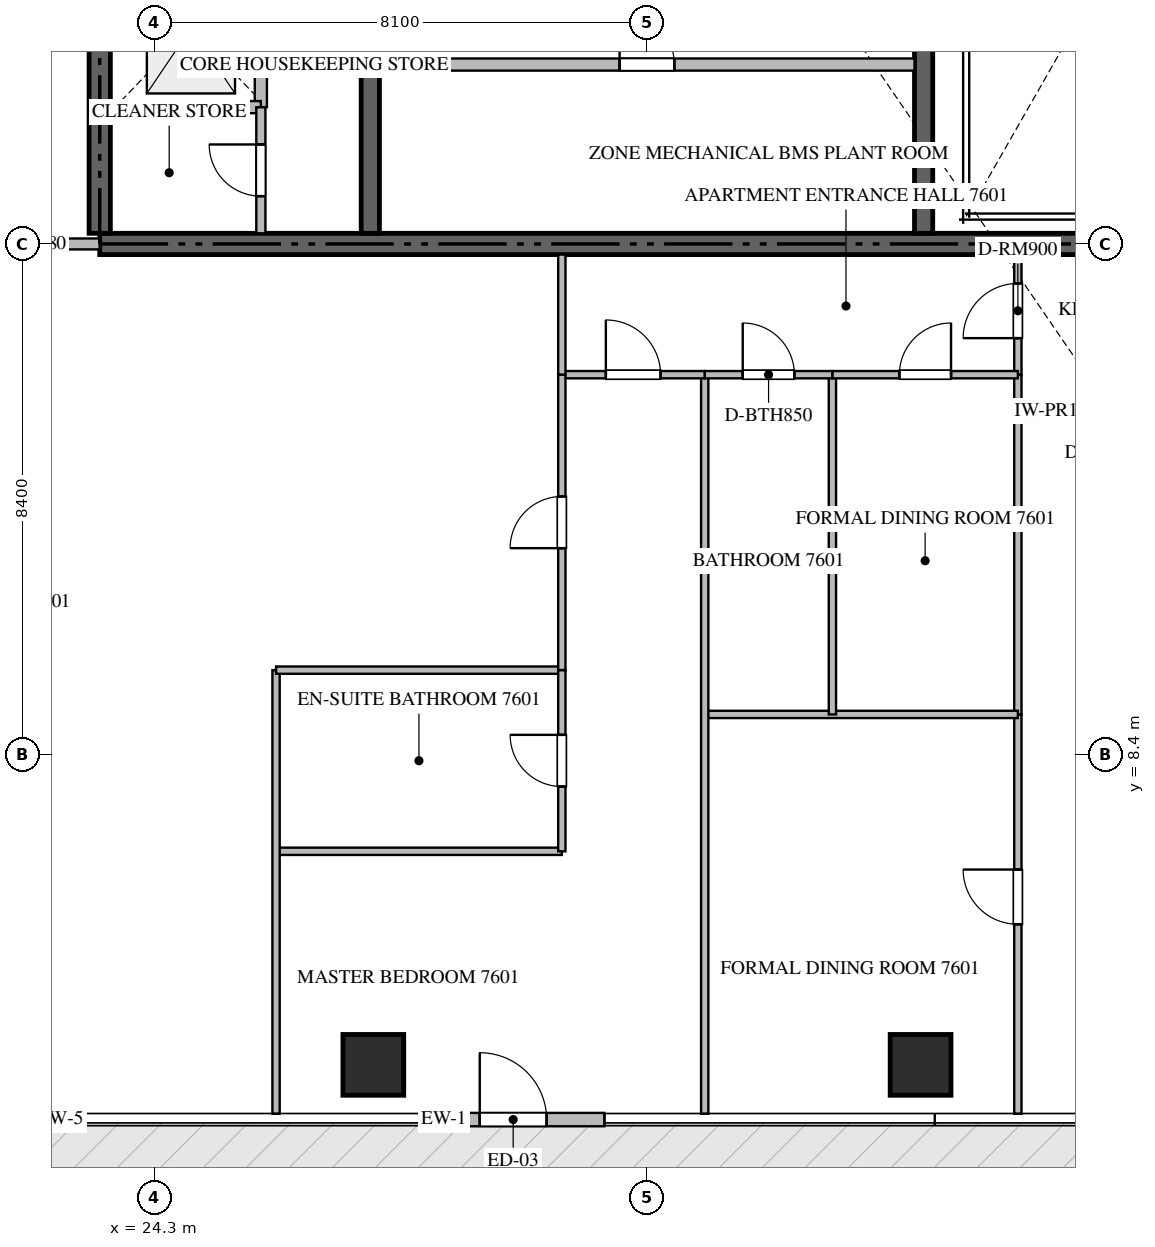
"""IFC4 building model, lengths in metres.
Left out: names, types, materials, properties, quantities, classifications, styles, units other than length and angle.
Written with IfcOpenShell. Run it as: python <this file> out.ifc"""

import sys

from ifc_helpers import new_model, si_unit, direction, frame, frame_2d, origin, origin_2d, place, context, subcontext, project, spatial, rectangle, extrude, source, transform, mapped, element, fill, save


model = new_model("IFC4")
c1 = context("Model", 3, precision=1e-05, world=origin(), true_north=direction((0.0, 1.0)))
c2 = subcontext(c1, "Body", "Model", "MODEL_VIEW")
j1 = project(units=[si_unit("LENGTHUNIT", "METRE"), si_unit("PLANEANGLEUNIT", "RADIAN")], contexts=[c1])
p1 = place(None, origin())
s1 = spatial("IfcSite", under=j1, at=p1, CompositionType="ELEMENT")
p2 = place(p1, origin())
s2 = spatial("IfcBuilding", under=s1, at=p2, CompositionType="ELEMENT")
p3 = place(p2, frame((0.0, 0.0, 305.6)))
s3 = spatial("IfcBuildingStorey", under=s2, at=p3, CompositionType="ELEMENT", Elevation=305.6)
p4 = place(p3, frame((23.4, 16.8, -0.26), z_axis=(0.0, 0.0, 1.0), x_axis=(1.0, 0.0, 0.0)))
e1 = element("IfcWall", 1, at=p4, inside=s3, PredefinedType="SHEAR", context=c2, shape_type="SweptSolid", body=[
    extrude(rectangle(XDim=18.0, YDim=0.35, at=frame_2d((9.0, 0.0))), origin(), (0.0, 0.0, 1.0), 4.048),
])
p5 = place(p3, frame((23.4, 16.975, -0.26), z_axis=(0.0, 0.0, 1.0), x_axis=(0.0, 1.0, 0.0)))
e2 = element("IfcWall", 2, at=p5, inside=s3, PredefinedType="SHEAR", context=c2, shape_type="SweptSolid", body=[
    extrude(rectangle(XDim=4.875, YDim=0.35, at=frame_2d((2.438, 0.0))), origin(), (0.0, 0.0, 1.0), 4.048),
])
p6 = place(p3, frame((27.85, 16.975, -0.26), z_axis=(0.0, 0.0, 1.0), x_axis=(0.0, 1.0, 0.0)))
e3 = element("IfcWall", 3, at=p6, inside=s3, PredefinedType="SHEAR", context=c2, shape_type="SweptSolid", body=[
    extrude(rectangle(XDim=4.875, YDim=0.3, at=frame_2d((2.438, 0.0))), origin(), (0.0, 0.0, 1.0), 4.048),
])
p7 = place(p3, frame((36.95, 16.975, -0.26), z_axis=(0.0, 0.0, 1.0), x_axis=(0.0, 1.0, 0.0)))
e4 = element("IfcWall", 4, at=p7, inside=s3, PredefinedType="SHEAR", context=c2, shape_type="SweptSolid", body=[
    extrude(rectangle(XDim=8.375, YDim=0.3, at=frame_2d((4.188, 0.0))), origin(), (0.0, 0.0, 1.0), 4.048),
])
m1 = source(origin(), c2, "Body", "SweptSolid", [
    extrude(rectangle(XDim=1.0, YDim=1.0, at=origin_2d()), origin(), (0.0, 0.0, 1.0), 4.05),
])
for number, where, z_axis, x_axis in (
    (5, (27.9, 3.3, -0.26), (0.0, 0.0, 1.0), (1.0, 0.0, 0.0)),
    (6, (36.9, 3.3, -0.26), (0.0, 0.0, 1.0), (1.0, 0.0, 0.0)),
):
    element("IfcColumn", number, at=place(p3, frame(where, z_axis=z_axis, x_axis=x_axis)), inside=s3, PredefinedType="COLUMN", context=c2, shape_type="MappedRepresentation", body=[
        mapped(m1, transform((0.0, 0.0, 0.0), scale=1.0)),
    ])
p8 = place(p3, frame((28.7, 2.4, 0.0), z_axis=(0.0, 0.0, 1.0), x_axis=(1.0, 0.0, 0.0)))
e7 = element("IfcWall", 7, at=p8, inside=s3, PredefinedType="ELEMENTEDWALL", context=c2, shape_type="SweptSolid", body=[
    extrude(rectangle(XDim=3.0, YDim=0.22, at=frame_2d((1.5, 0.0))), origin(), (0.0, 0.0, 1.0), 3.775),
])
p9 = place(p8, frame((0.95, 0.0, 0.0)))
e8 = element("IfcOpeningElement", 8, at=p9, cuts=e7, PredefinedType="OPENING", context=c2, shape_type="SweptSolid", body=[
    extrude(rectangle(XDim=1.1, YDim=2.2, at=frame_2d((0.55, 1.1))), frame((0.0, 0.12, 0.0), z_axis=(0.0, -1.0, 0.0), x_axis=(1.0, 0.0, 0.0)), (0.0, 0.0, 1.0), 0.24),
])
p10 = place(p3, frame((26.05, 19.05, 0.0), z_axis=(0.0, 0.0, 1.0), x_axis=(0.0, 1.0, 0.0)))
e9 = element("IfcWall", 9, at=p10, inside=s3, PredefinedType="STANDARD", context=c2, shape_type="SweptSolid", body=[
    extrude(rectangle(XDim=2.5, YDim=0.2, at=frame_2d((1.25, 0.0))), origin(), (0.0, 0.0, 1.0), 3.79),
])
p11 = place(p3, frame((23.575, 19.05, 0.0), z_axis=(0.0, 0.0, 1.0), x_axis=(1.0, 0.0, 0.0)))
e10 = element("IfcWall", 10, at=p11, inside=s3, PredefinedType="STANDARD", context=c2, shape_type="SweptSolid", body=[
    extrude(rectangle(XDim=2.475, YDim=0.2, at=frame_2d((1.238, 0.0))), origin(), (0.0, 0.0, 1.0), 3.79),
])
p12 = place(p3, frame((26.05, 16.975, 0.0), z_axis=(0.0, 0.0, 1.0), x_axis=(0.0, 1.0, 0.0)))
e11 = element("IfcWall", 11, at=p12, inside=s3, PredefinedType="PARTITIONING", context=c2, shape_type="SweptSolid", body=[
    extrude(rectangle(XDim=2.073, YDim=0.15, at=frame_2d((1.037, 0.0))), origin(), (0.0, 0.0, 1.0), 3.79),
])
p13 = place(p12, frame((0.611, 0.0, 0.0)))
e12 = element("IfcOpeningElement", 12, at=p13, cuts=e11, PredefinedType="OPENING", context=c2, shape_type="SweptSolid", body=[
    extrude(rectangle(XDim=0.85, YDim=2.1, at=frame_2d((0.425, 1.05))), frame((0.0, 0.085, 0.0), z_axis=(0.0, -1.0, 0.0), x_axis=(1.0, 0.0, 0.0)), (0.0, 0.0, 1.0), 0.17),
])
p14 = place(p3, frame((28.0, 19.75, 0.0), z_axis=(0.0, 0.0, 1.0), x_axis=(1.0, 0.0, 0.0)))
e13 = element("IfcWall", 13, at=p14, inside=s3, PredefinedType="STANDARD", context=c2, shape_type="SweptSolid", body=[
    extrude(rectangle(XDim=8.8, YDim=0.2, at=frame_2d((4.4, 0.0))), origin(), (0.0, 0.0, 1.0), 3.79),
])
p15 = place(p14, frame((3.95, 0.0, 0.0)))
e14 = element("IfcOpeningElement", 14, at=p15, cuts=e13, PredefinedType="OPENING", context=c2, shape_type="SweptSolid", body=[
    extrude(rectangle(XDim=0.9, YDim=2.1, at=frame_2d((0.45, 1.05))), frame((0.0, 0.11, 0.0), z_axis=(0.0, -1.0, 0.0), x_axis=(1.0, 0.0, 0.0)), (0.0, 0.0, 1.0), 0.22),
])
p16 = place(p3, frame((20.902, 16.8, 0.0), z_axis=(0.0, 0.0, 1.0), x_axis=(1.0, 0.0, 0.0)))
e15 = element("IfcWall", 15, at=p16, inside=s3, PredefinedType="PARTITIONING", context=c2, shape_type="SweptSolid", body=[
    extrude(rectangle(XDim=2.496, YDim=0.18, at=frame_2d((1.248, 0.0))), origin(), (0.0, 0.0, 1.0), 3.79),
])
p17 = place(p3, frame((38.5, 14.05, 0.0), z_axis=(0.0, 0.0, 1.0), x_axis=(1.0, 0.0, 0.0)))
e16 = element("IfcWall", 16, at=p17, inside=s3, PredefinedType="PARTITIONING", context=c2, shape_type="SweptSolid", body=[
    extrude(rectangle(XDim=2.85, YDim=0.12, at=frame_2d((1.425, 0.0))), origin(), (0.0, 0.0, 1.0), 3.512),
])
p18 = place(p17, frame((1.0, 0.0, 0.0)))
e17 = element("IfcOpeningElement", 17, at=p18, cuts=e16, PredefinedType="OPENING", context=c2, shape_type="SweptSolid", body=[
    extrude(rectangle(XDim=0.85, YDim=2.1, at=frame_2d((0.425, 1.05))), frame((0.0, 0.07, 0.0), z_axis=(0.0, -1.0, 0.0), x_axis=(1.0, 0.0, 0.0)), (0.0, 0.0, 1.0), 0.14),
])
p19 = place(p3, frame((38.5, 14.65, 0.0), z_axis=(0.0, 0.0, 1.0), x_axis=(0.0, 1.0, 0.0)))
e18 = element("IfcWall", 18, at=p19, inside=s3, PredefinedType="PARTITIONING", context=c2, shape_type="SweptSolid", body=[
    extrude(rectangle(XDim=1.975, YDim=0.12, at=frame_2d((0.988, 0.0))), origin(), (0.0, 0.0, 1.0), 3.79),
])
p20 = place(p19, frame((0.601, 0.0, 0.0)))
e19 = element("IfcOpeningElement", 19, at=p20, cuts=e18, PredefinedType="OPENING", context=c2, shape_type="SweptSolid", body=[
    extrude(rectangle(XDim=0.9, YDim=2.1, at=frame_2d((0.45, 1.05))), frame((0.0, 0.07, 0.0), z_axis=(0.0, -1.0, 0.0), x_axis=(1.0, 0.0, 0.0)), (0.0, 0.0, 1.0), 0.14),
])
p21 = place(p3, frame((38.5, 2.495, 0.0), z_axis=(0.0, 0.0, 1.0), x_axis=(0.0, 1.0, 0.0)))
e20 = element("IfcWall", 20, at=p21, inside=s3, PredefinedType="PARTITIONING", context=c2, shape_type="SweptSolid", body=[
    extrude(rectangle(XDim=6.568, YDim=0.12, at=frame_2d((3.284, 0.0))), origin(), (0.0, 0.0, 1.0), 3.79),
])
p22 = place(p21, frame((3.117, 0.0, 0.0)))
e21 = element("IfcOpeningElement", 21, at=p22, cuts=e20, PredefinedType="OPENING", context=c2, shape_type="SweptSolid", body=[
    extrude(rectangle(XDim=0.9, YDim=2.1, at=frame_2d((0.45, 1.05))), frame((0.0, 0.07, 0.0), z_axis=(0.0, -1.0, 0.0), x_axis=(1.0, 0.0, 0.0)), (0.0, 0.0, 1.0), 0.14),
])
p23 = place(p3, frame((38.5, 9.065, 0.0), z_axis=(0.0, 0.0, 1.0), x_axis=(0.0, 1.0, 0.0)))
e22 = element("IfcWall", 22, at=p23, inside=s3, PredefinedType="PARTITIONING", context=c2, shape_type="SweptSolid", body=[
    extrude(rectangle(XDim=5.583, YDim=0.12, at=frame_2d((2.792, 0.0))), origin(), (0.0, 0.0, 1.0), 3.79),
])
p24 = place(p3, frame((33.35, 9.063, 0.0), z_axis=(0.0, 0.0, 1.0), x_axis=(1.0, 0.0, 0.0)))
e23 = element("IfcWall", 23, at=p24, inside=s3, PredefinedType="PARTITIONING", context=c2, shape_type="SweptSolid", body=[
    extrude(rectangle(XDim=5.15, YDim=0.12, at=frame_2d((2.575, 0.0))), origin(), (0.0, 0.0, 1.0), 3.79),
])
p25 = place(p3, frame((33.35, 2.495, 0.0), z_axis=(0.0, 0.0, 1.0), x_axis=(0.0, 1.0, 0.0)))
e24 = element("IfcWall", 24, at=p25, inside=s3, PredefinedType="PARTITIONING", context=c2, shape_type="SweptSolid", body=[
    extrude(rectangle(XDim=12.155, YDim=0.12, at=frame_2d((6.077, 0.0))), origin(), (0.0, 0.0, 1.0), 3.79),
])
p26 = place(p3, frame((35.45, 9.063, 0.0), z_axis=(0.0, 0.0, 1.0), x_axis=(0.0, 1.0, 0.0)))
e25 = element("IfcWall", 25, at=p26, inside=s3, PredefinedType="PARTITIONING", context=c2, shape_type="SweptSolid", body=[
    extrude(rectangle(XDim=5.587, YDim=0.12, at=frame_2d((2.793, 0.0))), origin(), (0.0, 0.0, 1.0), 3.79),
])
p27 = place(p3, frame((33.35, 14.65, 0.0), z_axis=(0.0, 0.0, 1.0), x_axis=(1.0, 0.0, 0.0)))
e26 = element("IfcWall", 26, at=p27, inside=s3, PredefinedType="PARTITIONING", context=c2, shape_type="SweptSolid", body=[
    extrude(rectangle(XDim=2.1, YDim=0.12, at=frame_2d((1.05, 0.0))), origin(), (0.0, 0.0, 1.0), 3.79),
])
p28 = place(p27, frame((0.625, 0.0, 0.0)))
e27 = element("IfcOpeningElement", 27, at=p28, cuts=e26, PredefinedType="OPENING", context=c2, shape_type="SweptSolid", body=[
    extrude(rectangle(XDim=0.85, YDim=2.1, at=frame_2d((0.425, 1.05))), frame((0.0, 0.07, 0.0), z_axis=(0.0, -1.0, 0.0), x_axis=(1.0, 0.0, 0.0)), (0.0, 0.0, 1.0), 0.14),
])
p29 = place(p3, frame((35.452, 14.65, 0.0), z_axis=(0.0, 0.0, 1.0), x_axis=(1.0, 0.0, 0.0)))
e28 = element("IfcWall", 28, at=p29, inside=s3, PredefinedType="PARTITIONING", context=c2, shape_type="SweptSolid", body=[
    extrude(rectangle(XDim=3.048, YDim=0.12, at=frame_2d((1.524, 0.0))), origin(), (0.0, 0.0, 1.0), 3.79),
])
p30 = place(p29, frame((1.099, 0.0, 0.0)))
e29 = element("IfcOpeningElement", 29, at=p30, cuts=e28, PredefinedType="OPENING", context=c2, shape_type="SweptSolid", body=[
    extrude(rectangle(XDim=0.85, YDim=2.1, at=frame_2d((0.425, 1.05))), frame((0.0, 0.07, 0.0), z_axis=(0.0, -1.0, 0.0), x_axis=(1.0, 0.0, 0.0)), (0.0, 0.0, 1.0), 0.14),
])
p31 = place(p3, frame((31.0, 14.65, 0.0), z_axis=(0.0, 0.0, 1.0), x_axis=(1.0, 0.0, 0.0)))
e30 = element("IfcWall", 30, at=p31, inside=s3, PredefinedType="PARTITIONING", context=c2, shape_type="SweptSolid", body=[
    extrude(rectangle(XDim=2.348, YDim=0.12, at=frame_2d((1.174, 0.0))), origin(), (0.0, 0.0, 1.0), 3.79),
])
p32 = place(p31, frame((0.724, 0.0, 0.0)))
e31 = element("IfcOpeningElement", 31, at=p32, cuts=e30, PredefinedType="OPENING", context=c2, shape_type="SweptSolid", body=[
    extrude(rectangle(XDim=0.9, YDim=2.1, at=frame_2d((0.45, 1.05))), frame((0.0, 0.07, 0.0), z_axis=(0.0, -1.0, 0.0), x_axis=(1.0, 0.0, 0.0)), (0.0, 0.0, 1.0), 0.14),
])
p33 = place(p3, frame((26.3, 6.812, 0.0), z_axis=(0.0, 0.0, 1.0), x_axis=(1.0, 0.0, 0.0)))
e32 = element("IfcWall", 32, at=p33, inside=s3, PredefinedType="PARTITIONING", context=c2, shape_type="SweptSolid", body=[
    extrude(rectangle(XDim=4.7, YDim=0.12, at=frame_2d((2.35, 0.0))), origin(), (0.0, 0.0, 1.0), 3.79),
])
p34 = place(p3, frame((26.3, 2.495, 0.0), z_axis=(0.0, 0.0, 1.0), x_axis=(0.0, 1.0, 0.0)))
e33 = element("IfcWall", 33, at=p34, inside=s3, PredefinedType="PARTITIONING", context=c2, shape_type="SweptSolid", body=[
    extrude(rectangle(XDim=7.296, YDim=0.12, at=frame_2d((3.648, 0.0))), origin(), (0.0, 0.0, 1.0), 3.79),
])
p35 = place(p3, frame((26.3, 9.791, 0.0), z_axis=(0.0, 0.0, 1.0), x_axis=(1.0, 0.0, 0.0)))
e34 = element("IfcWall", 34, at=p35, inside=s3, PredefinedType="PARTITIONING", context=c2, shape_type="SweptSolid", body=[
    extrude(rectangle(XDim=4.7, YDim=0.12, at=frame_2d((2.35, 0.0))), origin(), (0.0, 0.0, 1.0), 3.79),
])
p36 = place(p3, frame((31.0, 6.812, 0.0), z_axis=(0.0, 0.0, 1.0), x_axis=(0.0, 1.0, 0.0)))
e35 = element("IfcWall", 35, at=p36, inside=s3, PredefinedType="PARTITIONING", context=c2, shape_type="SweptSolid", body=[
    extrude(rectangle(XDim=2.979, YDim=0.12, at=frame_2d((1.49, 0.0))), origin(), (0.0, 0.0, 1.0), 3.79),
])
p37 = place(p36, frame((1.065, 0.0, 0.0)))
e36 = element("IfcOpeningElement", 36, at=p37, cuts=e35, PredefinedType="OPENING", context=c2, shape_type="SweptSolid", body=[
    extrude(rectangle(XDim=0.85, YDim=2.1, at=frame_2d((0.425, 1.05))), frame((0.0, 0.07, 0.0), z_axis=(0.0, -1.0, 0.0), x_axis=(1.0, 0.0, 0.0)), (0.0, 0.0, 1.0), 0.14),
])
p38 = place(p3, frame((31.0, 9.793, 0.0), z_axis=(0.0, 0.0, 1.0), x_axis=(0.0, 1.0, 0.0)))
e37 = element("IfcWall", 37, at=p38, inside=s3, PredefinedType="PARTITIONING", context=c2, shape_type="SweptSolid", body=[
    extrude(rectangle(XDim=4.857, YDim=0.12, at=frame_2d((2.428, 0.0))), origin(), (0.0, 0.0, 1.0), 3.79),
])
p39 = place(p38, frame((2.004, 0.0, 0.0)))
e38 = element("IfcOpeningElement", 38, at=p39, cuts=e37, PredefinedType="OPENING", context=c2, shape_type="SweptSolid", body=[
    extrude(rectangle(XDim=0.85, YDim=2.1, at=frame_2d((0.425, 1.05))), frame((0.0, 0.07, 0.0), z_axis=(0.0, -1.0, 0.0), x_axis=(1.0, 0.0, 0.0)), (0.0, 0.0, 1.0), 0.14),
])
p40 = place(p3, frame((31.0, 14.652, 0.0), z_axis=(0.0, 0.0, 1.0), x_axis=(0.0, 1.0, 0.0)))
e39 = element("IfcWall", 39, at=p40, inside=s3, PredefinedType="PARTITIONING", context=c2, shape_type="SweptSolid", body=[
    extrude(rectangle(XDim=1.973, YDim=0.12, at=frame_2d((0.986, 0.0))), origin(), (0.0, 0.0, 1.0), 3.79),
])
m2 = source(origin(), c2, "Body", "SweptSolid", [
    extrude(rectangle(XDim=1.1, YDim=2.2, at=frame_2d((0.55, 1.1))), frame((0.0, 0.025, 0.0), z_axis=(0.0, -1.0, 0.0), x_axis=(1.0, 0.0, 0.0)), (0.0, 0.0, 1.0), 0.05),
])
p41 = place(p9, origin())
e40 = element("IfcDoor", 40, at=p41, inside=s3, OperationType="SINGLE_SWING_LEFT", PredefinedType="DOOR", context=c2, shape_type="MappedRepresentation", body=[
    mapped(m2, transform((0.0, 0.0, 0.0), scale=1.0)),
])
fill(e8, e40)
m3 = source(origin(), c2, "Body", "SweptSolid", [
    extrude(rectangle(XDim=0.85, YDim=2.1, at=frame_2d((0.425, 1.05))), frame((0.0, 0.025, 0.0), z_axis=(0.0, -1.0, 0.0), x_axis=(1.0, 0.0, 0.0)), (0.0, 0.0, 1.0), 0.05),
])
p42 = place(p13, origin())
e41 = element("IfcDoor", 41, at=p42, inside=s3, OperationType="SINGLE_SWING_RIGHT", PredefinedType="DOOR", context=c2, shape_type="MappedRepresentation", body=[
    mapped(m3, transform((0.0, 0.0, 0.0), scale=1.0)),
])
fill(e12, e41)
m4 = source(origin(), c2, "Body", "SweptSolid", [
    extrude(rectangle(XDim=0.9, YDim=2.1, at=frame_2d((0.45, 1.05))), frame((0.0, 0.025, 0.0), z_axis=(0.0, -1.0, 0.0), x_axis=(1.0, 0.0, 0.0)), (0.0, 0.0, 1.0), 0.05),
])
p43 = place(p15, origin())
e42 = element("IfcDoor", 42, at=p43, inside=s3, OperationType="SINGLE_SWING_LEFT", PredefinedType="DOOR", context=c2, shape_type="MappedRepresentation", body=[
    mapped(m4, transform((0.0, 0.0, 0.0), scale=1.0)),
])
fill(e14, e42)
p44 = place(p20, origin())
e43 = element("IfcDoor", 43, at=p44, inside=s3, OperationType="SINGLE_SWING_LEFT", PredefinedType="DOOR", context=c2, shape_type="MappedRepresentation", body=[
    mapped(m4, transform((0.0, 0.0, 0.0), scale=1.0)),
])
fill(e19, e43)
p45 = place(p22, origin())
e44 = element("IfcDoor", 44, at=p45, inside=s3, OperationType="SINGLE_SWING_RIGHT", PredefinedType="DOOR", context=c2, shape_type="MappedRepresentation", body=[
    mapped(m4, transform((0.0, 0.0, 0.0), scale=1.0)),
])
fill(e21, e44)
p46 = place(p28, origin())
e45 = element("IfcDoor", 45, at=p46, inside=s3, OperationType="SINGLE_SWING_LEFT", PredefinedType="DOOR", context=c2, shape_type="MappedRepresentation", body=[
    mapped(m3, transform((0.0, 0.0, 0.0), scale=1.0)),
])
fill(e27, e45)
p47 = place(p30, origin())
e46 = element("IfcDoor", 46, at=p47, inside=s3, OperationType="SINGLE_SWING_RIGHT", PredefinedType="DOOR", context=c2, shape_type="MappedRepresentation", body=[
    mapped(m3, transform((0.0, 0.0, 0.0), scale=1.0)),
])
fill(e29, e46)
p48 = place(p32, origin())
e47 = element("IfcDoor", 47, at=p48, inside=s3, OperationType="SINGLE_SWING_LEFT", PredefinedType="DOOR", context=c2, shape_type="MappedRepresentation", body=[
    mapped(m4, transform((0.0, 0.0, 0.0), scale=1.0)),
])
fill(e31, e47)
p49 = place(p37, origin())
e48 = element("IfcDoor", 48, at=p49, inside=s3, OperationType="SINGLE_SWING_RIGHT", PredefinedType="DOOR", context=c2, shape_type="MappedRepresentation", body=[
    mapped(m3, transform((0.0, 0.0, 0.0), scale=1.0)),
])
fill(e36, e48)
p50 = place(p39, origin())
e49 = element("IfcDoor", 49, at=p50, inside=s3, OperationType="SINGLE_SWING_LEFT", PredefinedType="DOOR", context=c2, shape_type="MappedRepresentation", body=[
    mapped(m3, transform((0.0, 0.0, 0.0), scale=1.0)),
])
fill(e38, e49)
save(model, sys.argv[1])
